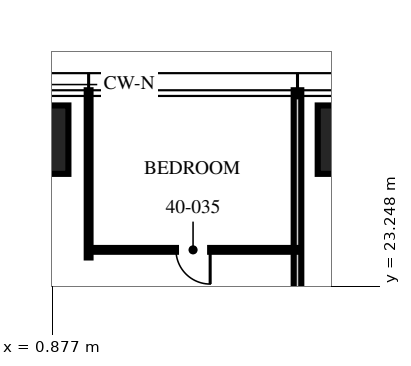
"""IFC4 building model, lengths in metres.
Left out: names, types, materials, properties, quantities, classifications, styles, units other than length and angle.
Written with IfcOpenShell. Run it as: python <this file> out.ifc"""

import sys

from ifc_helpers import new_model, si_unit, direction, frame, frame_2d, origin, origin_2d, place, context, subcontext, project, spatial, rectangle, extrude, element, fill, save


model = new_model("IFC4")
c1 = context("Model", 3, precision=1e-05, world=origin(), true_north=direction((0.0, 1.0)))
c2 = subcontext(c1, "Body", "Model", "MODEL_VIEW")
j1 = project(units=[si_unit("LENGTHUNIT", "METRE"), si_unit("PLANEANGLEUNIT", "RADIAN")], contexts=[c1])
p1 = place(None, origin())
s1 = spatial("IfcSite", under=j1, at=p1, CompositionType="ELEMENT")
p2 = place(p1, origin())
s2 = spatial("IfcBuilding", under=s1, at=p2, CompositionType="ELEMENT")
p3 = place(p2, frame((0.0, 0.0, 159.75)))
s3 = spatial("IfcBuildingStorey", under=s2, at=p3, CompositionType="ELEMENT", Elevation=159.75)
for number, where, z_axis, x_axis in (
    (1, (0.0, 27.1, 0.0), (0.0, 0.0, 1.0), (1.0, 0.0, 0.0)),
    (2, (9.16, 27.1, 0.0), (0.0, 0.0, 1.0), (1.0, 0.0, 0.0)),
):
    element("IfcColumn", number, at=place(p3, frame(where, z_axis=z_axis, x_axis=x_axis)), inside=s3, PredefinedType="COLUMN", context=c2, shape_type="SweptSolid", body=[
        extrude(rectangle(XDim=2.6, YDim=1.8, at=origin_2d()), origin(), (0.0, 0.0, 1.0), 3.75),
    ])
p4 = place(p3, frame((7.328, 16.5, 0.0), z_axis=(0.0, 0.0, 1.0), x_axis=(0.0, 1.0, 0.0)))
e3 = element("IfcWall", 3, at=p4, inside=s3, PredefinedType="PARTITIONING", context=c2, shape_type="SweptSolid", body=[
    extrude(rectangle(XDim=11.9, YDim=0.2, at=frame_2d((5.95, 0.0))), origin(), (0.0, 0.0, 1.0), 2.81),
])
p5 = place(p3, frame((1.832, 24.0, 0.0), z_axis=(0.0, 0.0, 1.0), x_axis=(0.0, 1.0, 0.0)))
e4 = element("IfcWall", 4, at=p5, inside=s3, PredefinedType="PARTITIONING", context=c2, shape_type="SweptSolid", body=[
    extrude(rectangle(XDim=4.4, YDim=0.1, at=frame_2d((2.2, 0.0))), origin(), (0.0, 0.0, 1.0), 2.81),
])
p6 = place(p3, frame((7.328, 24.2, 0.0), z_axis=(0.0, 0.0, 1.0), x_axis=(-1.0, 0.0, 0.0)))
e5 = element("IfcWall", 5, at=p6, inside=s3, PredefinedType="PARTITIONING", context=c2, shape_type="SweptSolid", body=[
    extrude(rectangle(XDim=5.496, YDim=0.1, at=frame_2d((2.748, 0.0))), origin(), (0.0, 0.0, 1.0), 2.81),
])
p7 = place(p6, frame((2.298, 0.0, 0.0)))
e6 = element("IfcOpeningElement", 6, at=p7, cuts=e5, PredefinedType="OPENING", context=c2, shape_type="SweptSolid", body=[
    extrude(rectangle(XDim=0.9, YDim=2.1, at=frame_2d((0.45, 1.05))), frame((0.0, 0.06, 0.0), z_axis=(0.0, -1.0, 0.0), x_axis=(1.0, 0.0, 0.0)), (0.0, 0.0, 1.0), 0.12),
])
p8 = place(p7, origin())
e7 = element("IfcDoor", 7, at=p8, inside=s3, OperationType="SINGLE_SWING_LEFT", PredefinedType="DOOR", context=c2, shape_type="SweptSolid", body=[
    extrude(rectangle(XDim=0.9, YDim=2.1, at=frame_2d((0.45, 1.05))), frame((0.0, 0.025, 0.0), z_axis=(0.0, -1.0, 0.0), x_axis=(1.0, 0.0, 0.0)), (0.0, 0.0, 1.0), 0.05),
])
fill(e6, e7)
save(model, sys.argv[1])
